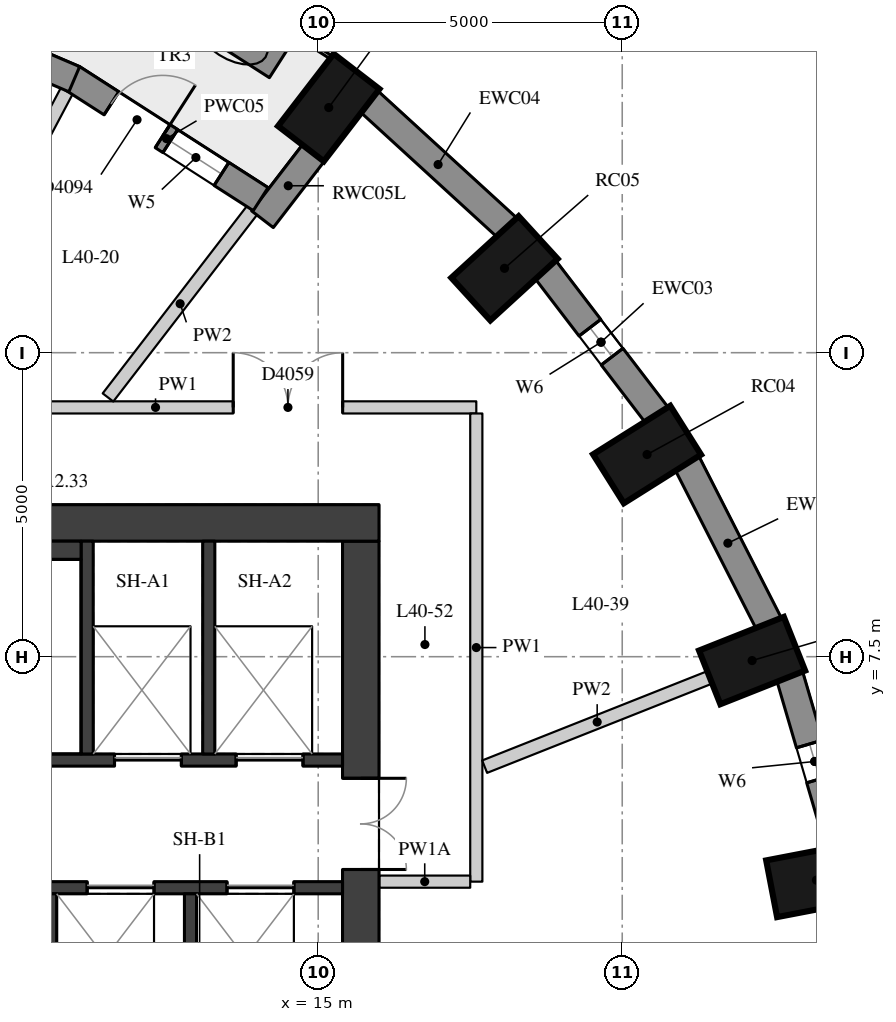
"""IFC4 building model, lengths in metres.
Left out: names, types, materials, properties, quantities, classifications, styles, units other than length and angle.
Written with IfcOpenShell. Run it as: python <this file> out.ifc"""

import sys

from ifc_helpers import new_model, si_unit, direction, frame, frame_2d, origin, origin_2d, place, context, subcontext, project, spatial, rectangle, extrude, element, fill, save


model = new_model("IFC4")
c1 = context("Model", 3, precision=1e-05, world=origin(), true_north=direction((0.0, 1.0)))
c2 = subcontext(c1, "Body", "Model", "MODEL_VIEW")
j1 = project(units=[si_unit("LENGTHUNIT", "METRE"), si_unit("PLANEANGLEUNIT", "RADIAN")], contexts=[c1])
p1 = place(None, origin())
s1 = spatial("IfcSite", under=j1, at=p1, CompositionType="ELEMENT")
p2 = place(p1, origin())
s2 = spatial("IfcBuilding", under=s1, at=p2, CompositionType="ELEMENT")
p3 = place(p2, frame((0.0, 0.0, 145.1)))
s3 = spatial("IfcBuildingStorey", under=s2, at=p3, CompositionType="ELEMENT", Elevation=145.1)
for number, where, z_axis, x_axis in (
    (1, (23.194, 3.825, 0.0), (0.0, 0.0, 1.0), (0.982, 0.189, 0.0)),
    (2, (22.136, 7.436, 0.0), (0.0, 0.0, 1.0), (0.93, 0.369, 0.0)),
    (3, (20.408, 10.825, 0.0), (0.0, 0.0, 1.0), (0.846, 0.533, 0.0)),
    (4, (18.064, 13.888, 0.0), (0.0, 0.0, 1.0), (0.738, 0.675, 0.0)),
    (5, (15.173, 16.532, 0.0), (0.0, 0.0, 1.0), (0.61, 0.792, 0.0)),
):
    element("IfcColumn", number, at=place(p3, frame(where, z_axis=z_axis, x_axis=x_axis)), inside=s3, PredefinedType="COLUMN", context=c2, shape_type="SweptSolid", body=[
        extrude(rectangle(XDim=1.5, YDim=0.95, at=origin_2d()), origin(), (0.0, 0.0, 1.0), 3.3),
    ])
p4 = place(p3, frame((23.58, 4.362, 0.0), z_axis=(0.0, 0.0, 1.0), x_axis=(-0.281049481624, 0.959693278542, 0.0)))
e6 = element("IfcWall", 6, at=p4, inside=s3, PredefinedType="SOLIDWALL", context=c2, shape_type="SweptSolid", body=[
    extrude(rectangle(XDim=2.948, YDim=0.45, at=frame_2d((1.474, 0.0))), origin(), (0.0, 0.0, 1.0), 3.02),
])
p5 = place(p4, frame((1.174, 0.0, 0.4)))
e7 = element("IfcOpeningElement", 7, at=p5, cuts=e6, PredefinedType="OPENING", context=c2, shape_type="SweptSolid", body=[
    extrude(rectangle(XDim=0.6, YDim=1.75, at=frame_2d((0.3, 0.875))), frame((0.0, 0.235, 0.0), z_axis=(0.0, -1.0, 0.0), x_axis=(1.0, 0.0, 0.0)), (0.0, 0.0, 1.0), 0.47),
])
p6 = place(p3, frame((22.415, 8.037, 0.0), z_axis=(0.0, 0.0, 1.0), x_axis=(-0.454133999889, 0.890933392653, 0.0)))
e8 = element("IfcWall", 8, at=p6, inside=s3, PredefinedType="SOLIDWALL", context=c2, shape_type="SweptSolid", body=[
    extrude(rectangle(XDim=2.986, YDim=0.45, at=frame_2d((1.493, 0.0))), origin(), (0.0, 0.0, 1.0), 3.02),
])
p7 = place(p3, frame((20.574, 11.467, 0.0), z_axis=(0.0, 0.0, 1.0), x_axis=(-0.607817056371, 0.794077090706, 0.0)))
e9 = element("IfcWall", 9, at=p7, inside=s3, PredefinedType="SOLIDWALL", context=c2, shape_type="SweptSolid", body=[
    extrude(rectangle(XDim=3.037, YDim=0.45, at=frame_2d((1.519, 0.0))), origin(), (0.0, 0.0, 1.0), 3.02),
])
p8 = place(p7, frame((1.219, 0.0, 0.4)))
e10 = element("IfcOpeningElement", 10, at=p8, cuts=e9, PredefinedType="OPENING", context=c2, shape_type="SweptSolid", body=[
    extrude(rectangle(XDim=0.6, YDim=1.75, at=frame_2d((0.3, 0.875))), frame((0.0, 0.235, 0.0), z_axis=(0.0, -1.0, 0.0), x_axis=(1.0, 0.0, 0.0)), (0.0, 0.0, 1.0), 0.47),
])
p9 = place(p3, frame((18.113, 14.55, 0.0), z_axis=(0.0, 0.0, 1.0), x_axis=(-0.737808755941, 0.675009807082, 0.0)))
e11 = element("IfcWall", 11, at=p9, inside=s3, PredefinedType="SOLIDWALL", context=c2, shape_type="SweptSolid", body=[
    extrude(rectangle(XDim=3.094, YDim=0.45, at=frame_2d((1.547, 0.0))), origin(), (0.0, 0.0, 1.0), 3.02),
])
p10 = place(p3, frame((14.931, 15.797, 0.0), z_axis=(0.0, 0.0, 1.0), x_axis=(-0.609897399413, -0.792480385996, 0.0)))
e12 = element("IfcWall", 12, at=p10, inside=s3, PredefinedType="SOLIDWALL", context=c2, shape_type="SweptSolid", body=[
    extrude(rectangle(XDim=1.391, YDim=0.45, at=frame_2d((0.695, 0.0))), origin(), (0.0, 0.0, 1.0), 3.02),
])
p11 = place(p3, frame((14.054, 15.025, 0.0), z_axis=(0.0, 0.0, 1.0), x_axis=(-0.841393801846, 0.54042249233, 0.0)))
e13 = element("IfcWall", 13, at=p11, inside=s3, PredefinedType="SOLIDWALL", context=c2, shape_type="SweptSolid", body=[
    extrude(rectangle(XDim=3.683, YDim=0.45, at=frame_2d((1.841, 0.0))), origin(), (0.0, 0.0, 1.0), 3.02),
])
p12 = place(p11, frame((0.766, 0.0, 0.4)))
e14 = element("IfcOpeningElement", 14, at=p12, cuts=e13, PredefinedType="OPENING", context=c2, shape_type="SweptSolid", body=[
    extrude(rectangle(XDim=1.0, YDim=1.75, at=frame_2d((0.5, 0.875))), frame((0.0, 0.235, 0.0), z_axis=(0.0, -1.0, 0.0), x_axis=(1.0, 0.0, 0.0)), (0.0, 0.0, 1.0), 0.47),
])
p13 = place(p11, frame((1.916, 0.0, 0.0)))
e15 = element("IfcOpeningElement", 15, at=p13, cuts=e13, PredefinedType="OPENING", context=c2, shape_type="SweptSolid", body=[
    extrude(rectangle(XDim=1.0, YDim=2.15, at=frame_2d((0.5, 1.075))), frame((0.0, 0.235, 0.0), z_axis=(0.0, -1.0, 0.0), x_axis=(1.0, 0.0, 0.0)), (0.0, 0.0, 1.0), 0.47),
])
p14 = place(p3, frame((10.988, 16.998, 0.0), z_axis=(0.0, 0.0, 1.0), x_axis=(-0.919443425894, 0.393222311907, 0.0)))
e16 = element("IfcWall", 16, at=p14, inside=s3, PredefinedType="SOLIDWALL", context=c2, shape_type="SweptSolid", body=[
    extrude(rectangle(XDim=3.763, YDim=0.45, at=frame_2d((1.882, 0.0))), origin(), (0.0, 0.0, 1.0), 3.02),
])
p15 = place(p14, frame((0.807, 0.0, 0.4)))
e17 = element("IfcOpeningElement", 17, at=p15, cuts=e16, PredefinedType="OPENING", context=c2, shape_type="SweptSolid", body=[
    extrude(rectangle(XDim=1.0, YDim=1.75, at=frame_2d((0.5, 0.875))), frame((0.0, 0.235, 0.0), z_axis=(0.0, -1.0, 0.0), x_axis=(1.0, 0.0, 0.0)), (0.0, 0.0, 1.0), 0.47),
])
p16 = place(p14, frame((1.957, 0.0, 0.0)))
e18 = element("IfcOpeningElement", 18, at=p16, cuts=e16, PredefinedType="OPENING", context=c2, shape_type="SweptSolid", body=[
    extrude(rectangle(XDim=1.0, YDim=2.15, at=frame_2d((0.5, 1.075))), frame((0.0, 0.235, 0.0), z_axis=(0.0, -1.0, 0.0), x_axis=(1.0, 0.0, 0.0)), (0.0, 0.0, 1.0), 0.47),
])
p17 = place(p3, frame((14.386, 17.318, 0.0), z_axis=(0.0, 0.0, 1.0), x_axis=(-0.842032375698, 0.539426990682, 0.0)))
e19 = element("IfcWall", 19, at=p17, inside=s3, PredefinedType="USERDEFINED", context=c2, shape_type="SweptSolid", body=[
    extrude(rectangle(XDim=1.8, YDim=0.7, at=frame_2d((0.9, 0.0))), origin(), (0.0, 0.0, 1.0), 0.75),
])
p18 = place(p3, frame((15.7, -9.4, 0.0), z_axis=(0.0, 0.0, 1.0), x_axis=(0.0, 1.0, 0.0)))
e20 = element("IfcWall", 20, at=p18, inside=s3, PredefinedType="SHEAR", context=c2, shape_type="SweptSolid", body=[
    extrude(rectangle(XDim=18.8, YDim=0.6, at=frame_2d((9.4, 0.0))), origin(), (0.0, 0.0, 1.0), 3.02),
])
p19 = place(p18, frame((13.4, 0.0, 0.0)))
e21 = element("IfcOpeningElement", 21, at=p19, cuts=e20, PredefinedType="OPENING", context=c2, shape_type="SweptSolid", body=[
    extrude(rectangle(XDim=1.5, YDim=2.1, at=frame_2d((0.75, 1.05))), frame((0.0, 0.31, 0.0), z_axis=(0.0, -1.0, 0.0), x_axis=(1.0, 0.0, 0.0)), (0.0, 0.0, 1.0), 0.62),
])
p20 = place(p18, frame((3.9, 0.0, 0.0)))
e22 = element("IfcOpeningElement", 22, at=p20, cuts=e20, PredefinedType="OPENING", context=c2, shape_type="SweptSolid", body=[
    extrude(rectangle(XDim=1.5, YDim=2.1, at=frame_2d((0.75, 1.05))), frame((0.0, 0.31, 0.0), z_axis=(0.0, -1.0, 0.0), x_axis=(1.0, 0.0, 0.0)), (0.0, 0.0, 1.0), 0.62),
])
p21 = place(p3, frame((4.0, 9.7, 0.0), z_axis=(0.0, 0.0, 1.0), x_axis=(1.0, 0.0, 0.0)))
e23 = element("IfcWall", 23, at=p21, inside=s3, PredefinedType="SHEAR", context=c2, shape_type="SweptSolid", body=[
    extrude(rectangle(XDim=12.0, YDim=0.6, at=frame_2d((6.0, 0.0))), origin(), (0.0, 0.0, 1.0), 3.02),
])
p22 = place(p3, frame((4.6, 5.8, 0.0), z_axis=(0.0, 0.0, 1.0), x_axis=(1.0, 0.0, 0.0)))
e24 = element("IfcWall", 24, at=p22, inside=s3, PredefinedType="SHEAR", context=c2, shape_type="SweptSolid", body=[
    extrude(rectangle(XDim=10.8, YDim=0.2, at=frame_2d((5.4, 0.0))), origin(), (0.0, 0.0, 1.0), 3.02),
])
p23 = place(p22, frame((7.05, 0.0, 0.0)))
e25 = element("IfcOpeningElement", 25, at=p23, cuts=e24, PredefinedType="OPENING", context=c2, shape_type="SweptSolid", body=[
    extrude(rectangle(XDim=1.1, YDim=2.1, at=frame_2d((0.55, 1.05))), frame((0.0, 0.11, 0.0), z_axis=(0.0, -1.0, 0.0), x_axis=(1.0, 0.0, 0.0)), (0.0, 0.0, 1.0), 0.22),
])
p24 = place(p22, frame((9.05, 0.0, 0.0)))
e26 = element("IfcOpeningElement", 26, at=p24, cuts=e24, PredefinedType="OPENING", context=c2, shape_type="SweptSolid", body=[
    extrude(rectangle(XDim=1.1, YDim=2.1, at=frame_2d((0.55, 1.05))), frame((0.0, 0.11, 0.0), z_axis=(0.0, -1.0, 0.0), x_axis=(1.0, 0.0, 0.0)), (0.0, 0.0, 1.0), 0.22),
])
p25 = place(p3, frame((4.6, 3.7, 0.0), z_axis=(0.0, 0.0, 1.0), x_axis=(1.0, 0.0, 0.0)))
e27 = element("IfcWall", 27, at=p25, inside=s3, PredefinedType="SHEAR", context=c2, shape_type="SweptSolid", body=[
    extrude(rectangle(XDim=10.8, YDim=0.2, at=frame_2d((5.4, 0.0))), origin(), (0.0, 0.0, 1.0), 3.02),
])
p26 = place(p25, frame((6.6, 0.0, 0.0)))
e28 = element("IfcOpeningElement", 28, at=p26, cuts=e27, PredefinedType="OPENING", context=c2, shape_type="SweptSolid", body=[
    extrude(rectangle(XDim=1.1, YDim=2.1, at=frame_2d((0.55, 1.05))), frame((0.0, 0.11, 0.0), z_axis=(0.0, -1.0, 0.0), x_axis=(1.0, 0.0, 0.0)), (0.0, 0.0, 1.0), 0.22),
])
p27 = place(p25, frame((8.9, 0.0, 0.0)))
e29 = element("IfcOpeningElement", 29, at=p27, cuts=e27, PredefinedType="OPENING", context=c2, shape_type="SweptSolid", body=[
    extrude(rectangle(XDim=1.1, YDim=2.1, at=frame_2d((0.55, 1.05))), frame((0.0, 0.11, 0.0), z_axis=(0.0, -1.0, 0.0), x_axis=(1.0, 0.0, 0.0)), (0.0, 0.0, 1.0), 0.22),
])
for number, where, z_axis, x_axis in (
    (30, (11.2, 5.9, 0.0), (0.0, 0.0, 1.0), (0.0, 1.0, 0.0)),
    (31, (13.2, 5.9, 0.0), (0.0, 0.0, 1.0), (0.0, 1.0, 0.0)),
):
    element("IfcWall", number, at=place(p3, frame(where, z_axis=z_axis, x_axis=x_axis)), inside=s3, PredefinedType="SHEAR", context=c2, shape_type="SweptSolid", body=[
        extrude(rectangle(XDim=3.5, YDim=0.2, at=frame_2d((1.75, 0.0))), origin(), (0.0, 0.0, 1.0), 3.02),
    ])
for number, where, z_axis, x_axis in (
    (32, (10.6, 1.1, 0.0), (0.0, 0.0, 1.0), (0.0, 1.0, 0.0)),
    (33, (12.9, 1.1, 0.0), (0.0, 0.0, 1.0), (0.0, 1.0, 0.0)),
):
    element("IfcWall", number, at=place(p3, frame(where, z_axis=z_axis, x_axis=x_axis)), inside=s3, PredefinedType="SHEAR", context=c2, shape_type="SweptSolid", body=[
        extrude(rectangle(XDim=2.5, YDim=0.2, at=frame_2d((1.25, 0.0))), origin(), (0.0, 0.0, 1.0), 3.02),
    ])
p28 = place(p3, frame((6.22, 9.25, 0.0), z_axis=(0.0, 0.0, 1.0), x_axis=(1.0, 0.0, 0.0)))
e34 = element("IfcWall", 34, at=p28, inside=s3, PredefinedType="PARTITIONING", context=c2, shape_type="SweptSolid", body=[
    extrude(rectangle(XDim=4.88, YDim=0.3, at=frame_2d((2.44, 0.0))), origin(), (0.0, 0.0, 1.0), 3.02),
])
p29 = place(p3, frame((7.05, 11.6, 0.0), z_axis=(0.0, 0.0, 1.0), x_axis=(1.0, 0.0, 0.0)))
e35 = element("IfcWall", 35, at=p29, inside=s3, PredefinedType="PARTITIONING", context=c2, shape_type="SweptSolid", body=[
    extrude(rectangle(XDim=10.551, YDim=0.2, at=frame_2d((5.275, 0.0))), origin(), (0.0, 0.0, 1.0), 3.02),
])
p30 = place(p29, frame((2.264, 0.0, 0.0)))
e36 = element("IfcOpeningElement", 36, at=p30, cuts=e35, PredefinedType="OPENING", context=c2, shape_type="SweptSolid", body=[
    extrude(rectangle(XDim=0.9, YDim=2.1, at=frame_2d((0.45, 1.05))), frame((0.0, 0.11, 0.0), z_axis=(0.0, -1.0, 0.0), x_axis=(1.0, 0.0, 0.0)), (0.0, 0.0, 1.0), 0.22),
])
p31 = place(p29, frame((6.553, 0.0, 0.0)))
e37 = element("IfcOpeningElement", 37, at=p31, cuts=e35, PredefinedType="OPENING", context=c2, shape_type="SweptSolid", body=[
    extrude(rectangle(XDim=1.8, YDim=2.1, at=frame_2d((0.9, 1.05))), frame((0.0, 0.11, 0.0), z_axis=(0.0, -1.0, 0.0), x_axis=(1.0, 0.0, 0.0)), (0.0, 0.0, 1.0), 0.22),
])
p32 = place(p3, frame((17.6, 11.5, 0.0), z_axis=(0.0, 0.0, 1.0), x_axis=(0.0, -1.0, 0.0)))
e38 = element("IfcWall", 38, at=p32, inside=s3, PredefinedType="PARTITIONING", context=c2, shape_type="SweptSolid", body=[
    extrude(rectangle(XDim=7.7, YDim=0.2, at=frame_2d((3.85, 0.0))), origin(), (0.0, 0.0, 1.0), 3.02),
])
p33 = place(p3, frame((17.5, 3.8, 0.0), z_axis=(0.0, 0.0, 1.0), x_axis=(-1.0, 0.0, 0.0)))
e39 = element("IfcWall", 39, at=p33, inside=s3, PredefinedType="PARTITIONING", context=c2, shape_type="SweptSolid", body=[
    extrude(rectangle(XDim=1.496, YDim=0.2, at=frame_2d((0.748, 0.0))), origin(), (0.0, 0.0, 1.0), 2.57),
])
p34 = place(p3, frame((21.439, 7.16, 0.0), z_axis=(0.0, 0.0, 1.0), x_axis=(-0.929517399972, -0.368778257426, 0.0)))
e40 = element("IfcWall", 40, at=p34, inside=s3, PredefinedType="PARTITIONING", context=c2, shape_type="SweptSolid", body=[
    extrude(rectangle(XDim=3.982, YDim=0.22, at=frame_2d((1.991, 0.0))), origin(), (0.0, 0.0, 1.0), 3.02),
])
p35 = place(p3, frame((13.916, 14.846, 0.0), z_axis=(0.0, 0.0, 1.0), x_axis=(-0.610023079405, -0.792383646091, 0.0)))
e41 = element("IfcWall", 41, at=p35, inside=s3, PredefinedType="PARTITIONING", context=c2, shape_type="SweptSolid", body=[
    extrude(rectangle(XDim=3.89, YDim=0.22, at=frame_2d((1.945, 0.0))), origin(), (0.0, 0.0, 1.0), 3.02),
])
p36 = place(p3, frame((10.865, 16.806, 0.0), z_axis=(0.0, 0.0, 1.0), x_axis=(-0.468046615648, -0.883703777054, 0.0)))
e42 = element("IfcWall", 42, at=p36, inside=s3, PredefinedType="PARTITIONING", context=c2, shape_type="SweptSolid", body=[
    extrude(rectangle(XDim=5.718, YDim=0.22, at=frame_2d((2.859, 0.0))), origin(), (0.0, 0.0, 1.0), 3.02),
])
p37 = place(p5, origin())
e43 = element("IfcWindow", 43, at=p37, inside=s3, PartitioningType="SINGLE_PANEL", PredefinedType="WINDOW", context=c2, shape_type="SweptSolid", body=[
    extrude(rectangle(XDim=0.6, YDim=1.75, at=frame_2d((0.3, 0.875))), frame((0.0, 0.035, 0.0), z_axis=(0.0, -1.0, 0.0), x_axis=(1.0, 0.0, 0.0)), (0.0, 0.0, 1.0), 0.06),
])
fill(e7, e43)
p38 = place(p8, origin())
e44 = element("IfcWindow", 44, at=p38, inside=s3, PartitioningType="SINGLE_PANEL", PredefinedType="WINDOW", context=c2, shape_type="SweptSolid", body=[
    extrude(rectangle(XDim=0.6, YDim=1.75, at=frame_2d((0.3, 0.875))), frame((0.0, 0.035, 0.0), z_axis=(0.0, -1.0, 0.0), x_axis=(1.0, 0.0, 0.0)), (0.0, 0.0, 1.0), 0.06),
])
fill(e10, e44)
p39 = place(p12, origin())
e45 = element("IfcWindow", 45, at=p39, inside=s3, PartitioningType="SINGLE_PANEL", PredefinedType="WINDOW", context=c2, shape_type="SweptSolid", body=[
    extrude(rectangle(XDim=1.0, YDim=1.75, at=frame_2d((0.5, 0.875))), frame((0.0, 0.035, 0.0), z_axis=(0.0, -1.0, 0.0), x_axis=(1.0, 0.0, 0.0)), (0.0, 0.0, 1.0), 0.06),
])
fill(e14, e45)
p40 = place(p13, frame((1.0, 0.0, 0.0), z_axis=(0.0, 0.0, 1.0), x_axis=(-1.0, 0.0, 0.0)))
e46 = element("IfcDoor", 46, at=p40, inside=s3, OperationType="SINGLE_SWING_RIGHT", PredefinedType="DOOR", context=c2, shape_type="SweptSolid", body=[
    extrude(rectangle(XDim=1.0, YDim=2.15, at=frame_2d((0.5, 1.075))), frame((0.0, 0.075, 0.0), z_axis=(0.0, -1.0, 0.0), x_axis=(1.0, 0.0, 0.0)), (0.0, 0.0, 1.0), 0.05),
])
fill(e15, e46)
p41 = place(p19, origin())
e47 = element("IfcDoor", 47, at=p41, inside=s3, OperationType="DOUBLE_DOOR_SINGLE_SWING", PredefinedType="DOOR", context=c2, shape_type="SweptSolid", body=[
    extrude(rectangle(XDim=1.5, YDim=2.1, at=frame_2d((0.75, 1.05))), frame((0.0, 0.025, 0.0), z_axis=(0.0, -1.0, 0.0), x_axis=(1.0, 0.0, 0.0)), (0.0, 0.0, 1.0), 0.05),
])
fill(e21, e47)
p42 = place(p23, origin())
e48 = element("IfcDoor", 48, at=p42, inside=s3, OperationType="DOUBLE_DOOR_SLIDING", PredefinedType="DOOR", context=c2, shape_type="SweptSolid", body=[
    extrude(rectangle(XDim=1.1, YDim=2.1, at=frame_2d((0.55, 1.05))), frame((0.0, 0.025, 0.0), z_axis=(0.0, -1.0, 0.0), x_axis=(1.0, 0.0, 0.0)), (0.0, 0.0, 1.0), 0.05),
])
fill(e25, e48)
p43 = place(p24, origin())
e49 = element("IfcDoor", 49, at=p43, inside=s3, OperationType="DOUBLE_DOOR_SLIDING", PredefinedType="DOOR", context=c2, shape_type="SweptSolid", body=[
    extrude(rectangle(XDim=1.1, YDim=2.1, at=frame_2d((0.55, 1.05))), frame((0.0, 0.025, 0.0), z_axis=(0.0, -1.0, 0.0), x_axis=(1.0, 0.0, 0.0)), (0.0, 0.0, 1.0), 0.05),
])
fill(e26, e49)
p44 = place(p26, origin())
e50 = element("IfcDoor", 50, at=p44, inside=s3, OperationType="DOUBLE_DOOR_SLIDING", PredefinedType="DOOR", context=c2, shape_type="SweptSolid", body=[
    extrude(rectangle(XDim=1.1, YDim=2.1, at=frame_2d((0.55, 1.05))), frame((0.0, 0.025, 0.0), z_axis=(0.0, -1.0, 0.0), x_axis=(1.0, 0.0, 0.0)), (0.0, 0.0, 1.0), 0.05),
])
fill(e28, e50)
p45 = place(p27, origin())
e51 = element("IfcDoor", 51, at=p45, inside=s3, OperationType="DOUBLE_DOOR_SLIDING", PredefinedType="DOOR", context=c2, shape_type="SweptSolid", body=[
    extrude(rectangle(XDim=1.1, YDim=2.1, at=frame_2d((0.55, 1.05))), frame((0.0, 0.025, 0.0), z_axis=(0.0, -1.0, 0.0), x_axis=(1.0, 0.0, 0.0)), (0.0, 0.0, 1.0), 0.05),
])
fill(e29, e51)
p46 = place(p31, origin())
e52 = element("IfcDoor", 52, at=p46, inside=s3, OperationType="DOUBLE_DOOR_SINGLE_SWING", PredefinedType="DOOR", context=c2, shape_type="SweptSolid", body=[
    extrude(rectangle(XDim=1.8, YDim=2.1, at=frame_2d((0.9, 1.05))), frame((0.0, 0.025, 0.0), z_axis=(0.0, -1.0, 0.0), x_axis=(1.0, 0.0, 0.0)), (0.0, 0.0, 1.0), 0.05),
])
fill(e37, e52)
save(model, sys.argv[1])
